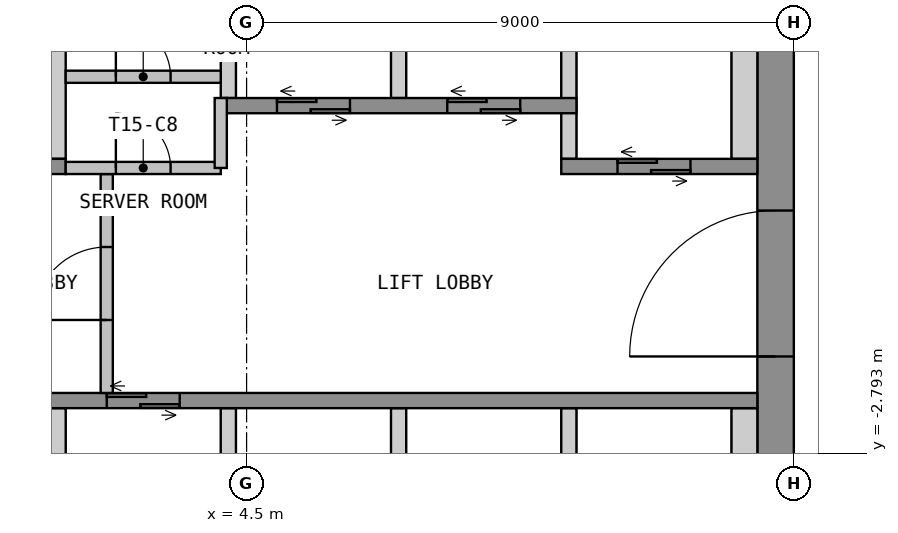
"""IFC4 building model, lengths in metres.
Left out: names, types, materials, properties, quantities, classifications, styles, units other than length and angle.
Written with IfcOpenShell. Run it as: python <this file> out.ifc"""

import sys

from ifc_helpers import new_model, si_unit, direction, frame, frame_2d, origin, place, context, subcontext, project, spatial, polyline, rectangle, outline, extrude, element, fill, save


model = new_model("IFC4")
c1 = context("Model", 3, precision=1e-05, world=origin(), true_north=direction((0.0, 1.0)))
c2 = subcontext(c1, "Body", "Model", "MODEL_VIEW")
j1 = project(units=[si_unit("LENGTHUNIT", "METRE"), si_unit("PLANEANGLEUNIT", "RADIAN")], contexts=[c1])
p1 = place(None, origin())
s1 = spatial("IfcSite", under=j1, at=p1, CompositionType="ELEMENT")
p2 = place(p1, origin())
s2 = spatial("IfcBuilding", under=s1, at=p2, CompositionType="ELEMENT")
p3 = place(p2, frame((0.0, 0.0, 207.3)))
s3 = spatial("IfcBuildingStorey", under=s2, at=p3, CompositionType="ELEMENT", Elevation=207.3)
p4 = place(p3, frame((13.2, -10.65, 0.0), z_axis=(0.0, 0.0, 1.0), x_axis=(0.0, 1.0, 0.0)))
e1 = element("IfcWall", 1, at=p4, inside=s3, PredefinedType="SHEAR", context=c2, shape_type="SweptSolid", body=[
    extrude(rectangle(XDim=21.3, YDim=0.6, at=frame_2d((10.65, 0.0))), origin(), (0.0, 0.0, 1.0), 3.55),
])
p5 = place(p4, frame((9.45, 0.0, 0.0)))
e2 = element("IfcOpeningElement", 2, at=p5, cuts=e1, PredefinedType="OPENING", context=c2, shape_type="SweptSolid", body=[
    extrude(rectangle(XDim=2.4, YDim=2.1, at=frame_2d((1.2, 1.05))), frame((0.0, 0.31, 0.0), z_axis=(0.0, -1.0, 0.0), x_axis=(1.0, 0.0, 0.0)), (0.0, 0.0, 1.0), 0.62),
])
p6 = place(p3, origin())
e3 = element("IfcWall", 3, at=p6, inside=s3, PredefinedType="SHEAR", context=c2, shape_type="SweptSolid", body=[
    extrude(outline(polyline([(1.275, 2.05), (1.525, 2.05), (1.525, 4.75), (1.275, 4.75), (1.275, 2.05)])), origin(), (0.0, 0.0, 1.0), 3.55),
])
p7 = place(p3, origin())
e4 = element("IfcWall", 4, at=p7, inside=s3, PredefinedType="SHEAR", context=c2, shape_type="SweptSolid", body=[
    extrude(outline(polyline([(9.675, 2.05), (9.925, 2.05), (9.925, 4.75), (9.675, 4.75), (9.675, 2.05)])), origin(), (0.0, 0.0, 1.0), 3.55),
])
p8 = place(p3, origin())
e5 = element("IfcWall", 5, at=p8, inside=s3, PredefinedType="SHEAR", context=c2, shape_type="SweptSolid", body=[
    extrude(outline(polyline([(12.475, 2.05), (12.9, 2.05), (12.9, 4.75), (12.475, 4.75), (12.475, 2.05)])), origin(), (0.0, 0.0, 1.0), 3.55),
])
p9 = place(p3, origin())
e6 = element("IfcWall", 6, at=p9, inside=s3, PredefinedType="SHEAR", context=c2, shape_type="SweptSolid", body=[
    extrude(outline(polyline([(4.075, 3.05), (4.325, 3.05), (4.325, 4.75), (4.075, 4.75), (4.075, 3.05)])), origin(), (0.0, 0.0, 1.0), 3.55),
])
p10 = place(p3, origin())
e7 = element("IfcWall", 7, at=p10, inside=s3, PredefinedType="SHEAR", context=c2, shape_type="SweptSolid", body=[
    extrude(outline(polyline([(6.875, 3.05), (7.125, 3.05), (7.125, 4.75), (6.875, 4.75), (6.875, 3.05)])), origin(), (0.0, 0.0, 1.0), 3.55),
])
p11 = place(p3, frame((-1.525, 1.925, 0.0), z_axis=(0.0, 0.0, 1.0), x_axis=(1.0, 0.0, 0.0)))
e8 = element("IfcWall", 8, at=p11, inside=s3, PredefinedType="SHEAR", context=c2, shape_type="SweptSolid", body=[
    extrude(rectangle(XDim=3.05, YDim=0.25, at=frame_2d((1.525, 0.0))), origin(), (0.0, 0.0, 1.0), 3.55),
])
p12 = place(p11, frame((0.925, 0.0, 0.0)))
e9 = element("IfcOpeningElement", 9, at=p12, cuts=e8, PredefinedType="OPENING", context=c2, shape_type="SweptSolid", body=[
    extrude(rectangle(XDim=1.2, YDim=2.1, at=frame_2d((0.6, 1.05))), frame((0.0, 0.135, 0.0), z_axis=(0.0, -1.0, 0.0), x_axis=(1.0, 0.0, 0.0)), (0.0, 0.0, 1.0), 0.27),
])
p13 = place(p3, frame((4.075, 2.925, 0.0), z_axis=(0.0, 0.0, 1.0), x_axis=(1.0, 0.0, 0.0)))
e10 = element("IfcWall", 10, at=p13, inside=s3, PredefinedType="SHEAR", context=c2, shape_type="SweptSolid", body=[
    extrude(rectangle(XDim=5.85, YDim=0.25, at=frame_2d((2.925, 0.0))), origin(), (0.0, 0.0, 1.0), 3.55),
])
p14 = place(p13, frame((0.925, 0.0, 0.0)))
e11 = element("IfcOpeningElement", 11, at=p14, cuts=e10, PredefinedType="OPENING", context=c2, shape_type="SweptSolid", body=[
    extrude(rectangle(XDim=1.2, YDim=2.1, at=frame_2d((0.6, 1.05))), frame((0.0, 0.135, 0.0), z_axis=(0.0, -1.0, 0.0), x_axis=(1.0, 0.0, 0.0)), (0.0, 0.0, 1.0), 0.27),
])
p15 = place(p13, frame((3.725, 0.0, 0.0)))
e12 = element("IfcOpeningElement", 12, at=p15, cuts=e10, PredefinedType="OPENING", context=c2, shape_type="SweptSolid", body=[
    extrude(rectangle(XDim=1.2, YDim=2.1, at=frame_2d((0.6, 1.05))), frame((0.0, 0.135, 0.0), z_axis=(0.0, -1.0, 0.0), x_axis=(1.0, 0.0, 0.0)), (0.0, 0.0, 1.0), 0.27),
])
p16 = place(p3, frame((9.675, 1.925, 0.0), z_axis=(0.0, 0.0, 1.0), x_axis=(1.0, 0.0, 0.0)))
e13 = element("IfcWall", 13, at=p16, inside=s3, PredefinedType="SHEAR", context=c2, shape_type="SweptSolid", body=[
    extrude(rectangle(XDim=3.225, YDim=0.25, at=frame_2d((1.612, 0.0))), origin(), (0.0, 0.0, 1.0), 3.55),
])
p17 = place(p16, frame((0.925, 0.0, 0.0)))
e14 = element("IfcOpeningElement", 14, at=p17, cuts=e13, PredefinedType="OPENING", context=c2, shape_type="SweptSolid", body=[
    extrude(rectangle(XDim=1.2, YDim=2.1, at=frame_2d((0.6, 1.05))), frame((0.0, 0.135, 0.0), z_axis=(0.0, -1.0, 0.0), x_axis=(1.0, 0.0, 0.0)), (0.0, 0.0, 1.0), 0.27),
])
p18 = place(p3, origin())
e15 = element("IfcWall", 15, at=p18, inside=s3, PredefinedType="SHEAR", context=c2, shape_type="SweptSolid", body=[
    extrude(outline(polyline([(1.275, -4.75), (1.525, -4.75), (1.525, -2.05), (1.275, -2.05), (1.275, -4.75)])), origin(), (0.0, 0.0, 1.0), 3.55),
])
p19 = place(p3, origin())
e16 = element("IfcWall", 16, at=p19, inside=s3, PredefinedType="SHEAR", context=c2, shape_type="SweptSolid", body=[
    extrude(outline(polyline([(4.075, -4.75), (4.325, -4.75), (4.325, -2.05), (4.075, -2.05), (4.075, -4.75)])), origin(), (0.0, 0.0, 1.0), 3.55),
])
p20 = place(p3, origin())
e17 = element("IfcWall", 17, at=p20, inside=s3, PredefinedType="SHEAR", context=c2, shape_type="SweptSolid", body=[
    extrude(outline(polyline([(6.875, -4.75), (7.125, -4.75), (7.125, -2.05), (6.875, -2.05), (6.875, -4.75)])), origin(), (0.0, 0.0, 1.0), 3.55),
])
p21 = place(p3, origin())
e18 = element("IfcWall", 18, at=p21, inside=s3, PredefinedType="SHEAR", context=c2, shape_type="SweptSolid", body=[
    extrude(outline(polyline([(9.675, -4.75), (9.925, -4.75), (9.925, -2.05), (9.675, -2.05), (9.675, -4.75)])), origin(), (0.0, 0.0, 1.0), 3.55),
])
p22 = place(p3, origin())
e19 = element("IfcWall", 19, at=p22, inside=s3, PredefinedType="SHEAR", context=c2, shape_type="SweptSolid", body=[
    extrude(outline(polyline([(12.475, -4.75), (12.9, -4.75), (12.9, -2.05), (12.475, -2.05), (12.475, -4.75)])), origin(), (0.0, 0.0, 1.0), 3.55),
])
p23 = place(p3, frame((-1.525, -1.925, 0.0), z_axis=(0.0, 0.0, 1.0), x_axis=(1.0, 0.0, 0.0)))
e20 = element("IfcWall", 20, at=p23, inside=s3, PredefinedType="SHEAR", context=c2, shape_type="SweptSolid", body=[
    extrude(rectangle(XDim=14.425, YDim=0.25, at=frame_2d((7.212, 0.0))), origin(), (0.0, 0.0, 1.0), 3.55),
])
p24 = place(p23, frame((0.925, 0.0, 0.0)))
e21 = element("IfcOpeningElement", 21, at=p24, cuts=e20, PredefinedType="OPENING", context=c2, shape_type="SweptSolid", body=[
    extrude(rectangle(XDim=1.2, YDim=2.1, at=frame_2d((0.6, 1.05))), frame((0.0, 0.135, 0.0), z_axis=(0.0, -1.0, 0.0), x_axis=(1.0, 0.0, 0.0)), (0.0, 0.0, 1.0), 0.27),
])
p25 = place(p23, frame((3.725, 0.0, 0.0)))
e22 = element("IfcOpeningElement", 22, at=p25, cuts=e20, PredefinedType="OPENING", context=c2, shape_type="SweptSolid", body=[
    extrude(rectangle(XDim=1.2, YDim=2.1, at=frame_2d((0.6, 1.05))), frame((0.0, 0.135, 0.0), z_axis=(0.0, -1.0, 0.0), x_axis=(1.0, 0.0, 0.0)), (0.0, 0.0, 1.0), 0.27),
])
p26 = place(p3, frame((2.2, -1.8, 0.0), z_axis=(0.0, 0.0, 1.0), x_axis=(0.0, 1.0, 0.0)))
e23 = element("IfcWall", 23, at=p26, inside=s3, PredefinedType="PARTITIONING", context=c2, shape_type="SweptSolid", body=[
    extrude(rectangle(XDim=3.6, YDim=0.2, at=frame_2d((1.8, 0.0))), origin(), (0.0, 0.0, 1.0), 3.55),
])
p27 = place(p26, frame((1.2, 0.0, 0.0)))
e24 = element("IfcOpeningElement", 24, at=p27, cuts=e23, PredefinedType="OPENING", context=c2, shape_type="SweptSolid", body=[
    extrude(rectangle(XDim=1.2, YDim=2.1, at=frame_2d((0.6, 1.05))), frame((0.0, 0.11, 0.0), z_axis=(0.0, -1.0, 0.0), x_axis=(1.0, 0.0, 0.0)), (0.0, 0.0, 1.0), 0.22),
])
p28 = place(p3, frame((1.525, 3.4, 0.0), z_axis=(0.0, 0.0, 1.0), x_axis=(1.0, 0.0, 0.0)))
e25 = element("IfcWall", 25, at=p28, inside=s3, PredefinedType="PARTITIONING", context=c2, shape_type="SweptSolid", body=[
    extrude(rectangle(XDim=2.55, YDim=0.2, at=frame_2d((1.275, 0.0))), origin(), (0.0, 0.0, 1.0), 3.55),
])
p29 = place(p28, frame((0.825, 0.0, 0.0)))
e26 = element("IfcOpeningElement", 26, at=p29, cuts=e25, PredefinedType="OPENING", context=c2, shape_type="SweptSolid", body=[
    extrude(rectangle(XDim=0.9, YDim=2.1, at=frame_2d((0.45, 1.05))), frame((0.0, 0.11, 0.0), z_axis=(0.0, -1.0, 0.0), x_axis=(1.0, 0.0, 0.0)), (0.0, 0.0, 1.0), 0.22),
])
p30 = place(p3, frame((1.525, 1.9, 0.0), z_axis=(0.0, 0.0, 1.0), x_axis=(1.0, 0.0, 0.0)))
e27 = element("IfcWall", 27, at=p30, inside=s3, PredefinedType="PARTITIONING", context=c2, shape_type="SweptSolid", body=[
    extrude(rectangle(XDim=2.55, YDim=0.2, at=frame_2d((1.275, 0.0))), origin(), (0.0, 0.0, 1.0), 3.55),
])
p31 = place(p30, frame((0.825, 0.0, 0.0)))
e28 = element("IfcOpeningElement", 28, at=p31, cuts=e27, PredefinedType="OPENING", context=c2, shape_type="SweptSolid", body=[
    extrude(rectangle(XDim=0.9, YDim=2.1, at=frame_2d((0.45, 1.05))), frame((0.0, 0.11, 0.0), z_axis=(0.0, -1.0, 0.0), x_axis=(1.0, 0.0, 0.0)), (0.0, 0.0, 1.0), 0.22),
])
p32 = place(p3, frame((4.075, 1.9, 0.0), z_axis=(0.0, 0.0, 1.0), x_axis=(0.0, 1.0, 0.0)))
e29 = element("IfcWall", 29, at=p32, inside=s3, PredefinedType="PARTITIONING", context=c2, shape_type="SweptSolid", body=[
    extrude(rectangle(XDim=1.15, YDim=0.2, at=frame_2d((0.575, 0.0))), origin(), (0.0, 0.0, 1.0), 3.55),
])
p33 = place(p5, origin())
e30 = element("IfcDoor", 30, at=p33, inside=s3, OperationType="DOUBLE_DOOR_DOUBLE_SWING", PredefinedType="DOOR", context=c2, shape_type="SweptSolid", body=[
    extrude(rectangle(XDim=2.4, YDim=2.1, at=frame_2d((1.2, 1.05))), frame((0.0, 0.025, 0.0), z_axis=(0.0, -1.0, 0.0), x_axis=(1.0, 0.0, 0.0)), (0.0, 0.0, 1.0), 0.05),
])
fill(e2, e30)
p34 = place(p14, origin())
e31 = element("IfcDoor", 31, at=p34, inside=s3, OperationType="DOUBLE_DOOR_SLIDING", PredefinedType="DOOR", context=c2, shape_type="SweptSolid", body=[
    extrude(rectangle(XDim=1.2, YDim=2.1, at=frame_2d((0.6, 1.05))), frame((0.0, 0.025, 0.0), z_axis=(0.0, -1.0, 0.0), x_axis=(1.0, 0.0, 0.0)), (0.0, 0.0, 1.0), 0.05),
])
fill(e11, e31)
p35 = place(p15, origin())
e32 = element("IfcDoor", 32, at=p35, inside=s3, OperationType="DOUBLE_DOOR_SLIDING", PredefinedType="DOOR", context=c2, shape_type="SweptSolid", body=[
    extrude(rectangle(XDim=1.2, YDim=2.1, at=frame_2d((0.6, 1.05))), frame((0.0, 0.025, 0.0), z_axis=(0.0, -1.0, 0.0), x_axis=(1.0, 0.0, 0.0)), (0.0, 0.0, 1.0), 0.05),
])
fill(e12, e32)
p36 = place(p17, origin())
e33 = element("IfcDoor", 33, at=p36, inside=s3, OperationType="DOUBLE_DOOR_SLIDING", PredefinedType="DOOR", context=c2, shape_type="SweptSolid", body=[
    extrude(rectangle(XDim=1.2, YDim=2.1, at=frame_2d((0.6, 1.05))), frame((0.0, 0.025, 0.0), z_axis=(0.0, -1.0, 0.0), x_axis=(1.0, 0.0, 0.0)), (0.0, 0.0, 1.0), 0.05),
])
fill(e14, e33)
p37 = place(p25, origin())
e34 = element("IfcDoor", 34, at=p37, inside=s3, OperationType="DOUBLE_DOOR_SLIDING", PredefinedType="DOOR", context=c2, shape_type="SweptSolid", body=[
    extrude(rectangle(XDim=1.2, YDim=2.1, at=frame_2d((0.6, 1.05))), frame((0.0, 0.025, 0.0), z_axis=(0.0, -1.0, 0.0), x_axis=(1.0, 0.0, 0.0)), (0.0, 0.0, 1.0), 0.05),
])
fill(e22, e34)
p38 = place(p27, origin())
e35 = element("IfcDoor", 35, at=p38, inside=s3, OperationType="SINGLE_SWING_LEFT", PredefinedType="DOOR", context=c2, shape_type="SweptSolid", body=[
    extrude(rectangle(XDim=1.2, YDim=2.1, at=frame_2d((0.6, 1.05))), frame((0.0, 0.025, 0.0), z_axis=(0.0, -1.0, 0.0), x_axis=(1.0, 0.0, 0.0)), (0.0, 0.0, 1.0), 0.05),
])
fill(e24, e35)
p39 = place(p29, origin())
e36 = element("IfcDoor", 36, at=p39, inside=s3, OperationType="SINGLE_SWING_LEFT", PredefinedType="DOOR", context=c2, shape_type="SweptSolid", body=[
    extrude(rectangle(XDim=0.9, YDim=2.1, at=frame_2d((0.45, 1.05))), frame((0.0, 0.025, 0.0), z_axis=(0.0, -1.0, 0.0), x_axis=(1.0, 0.0, 0.0)), (0.0, 0.0, 1.0), 0.05),
])
fill(e26, e36)
p40 = place(p31, origin())
e37 = element("IfcDoor", 37, at=p40, inside=s3, OperationType="SINGLE_SWING_LEFT", PredefinedType="DOOR", context=c2, shape_type="SweptSolid", body=[
    extrude(rectangle(XDim=0.9, YDim=2.1, at=frame_2d((0.45, 1.05))), frame((0.0, 0.025, 0.0), z_axis=(0.0, -1.0, 0.0), x_axis=(1.0, 0.0, 0.0)), (0.0, 0.0, 1.0), 0.05),
])
fill(e28, e37)
save(model, sys.argv[1])
